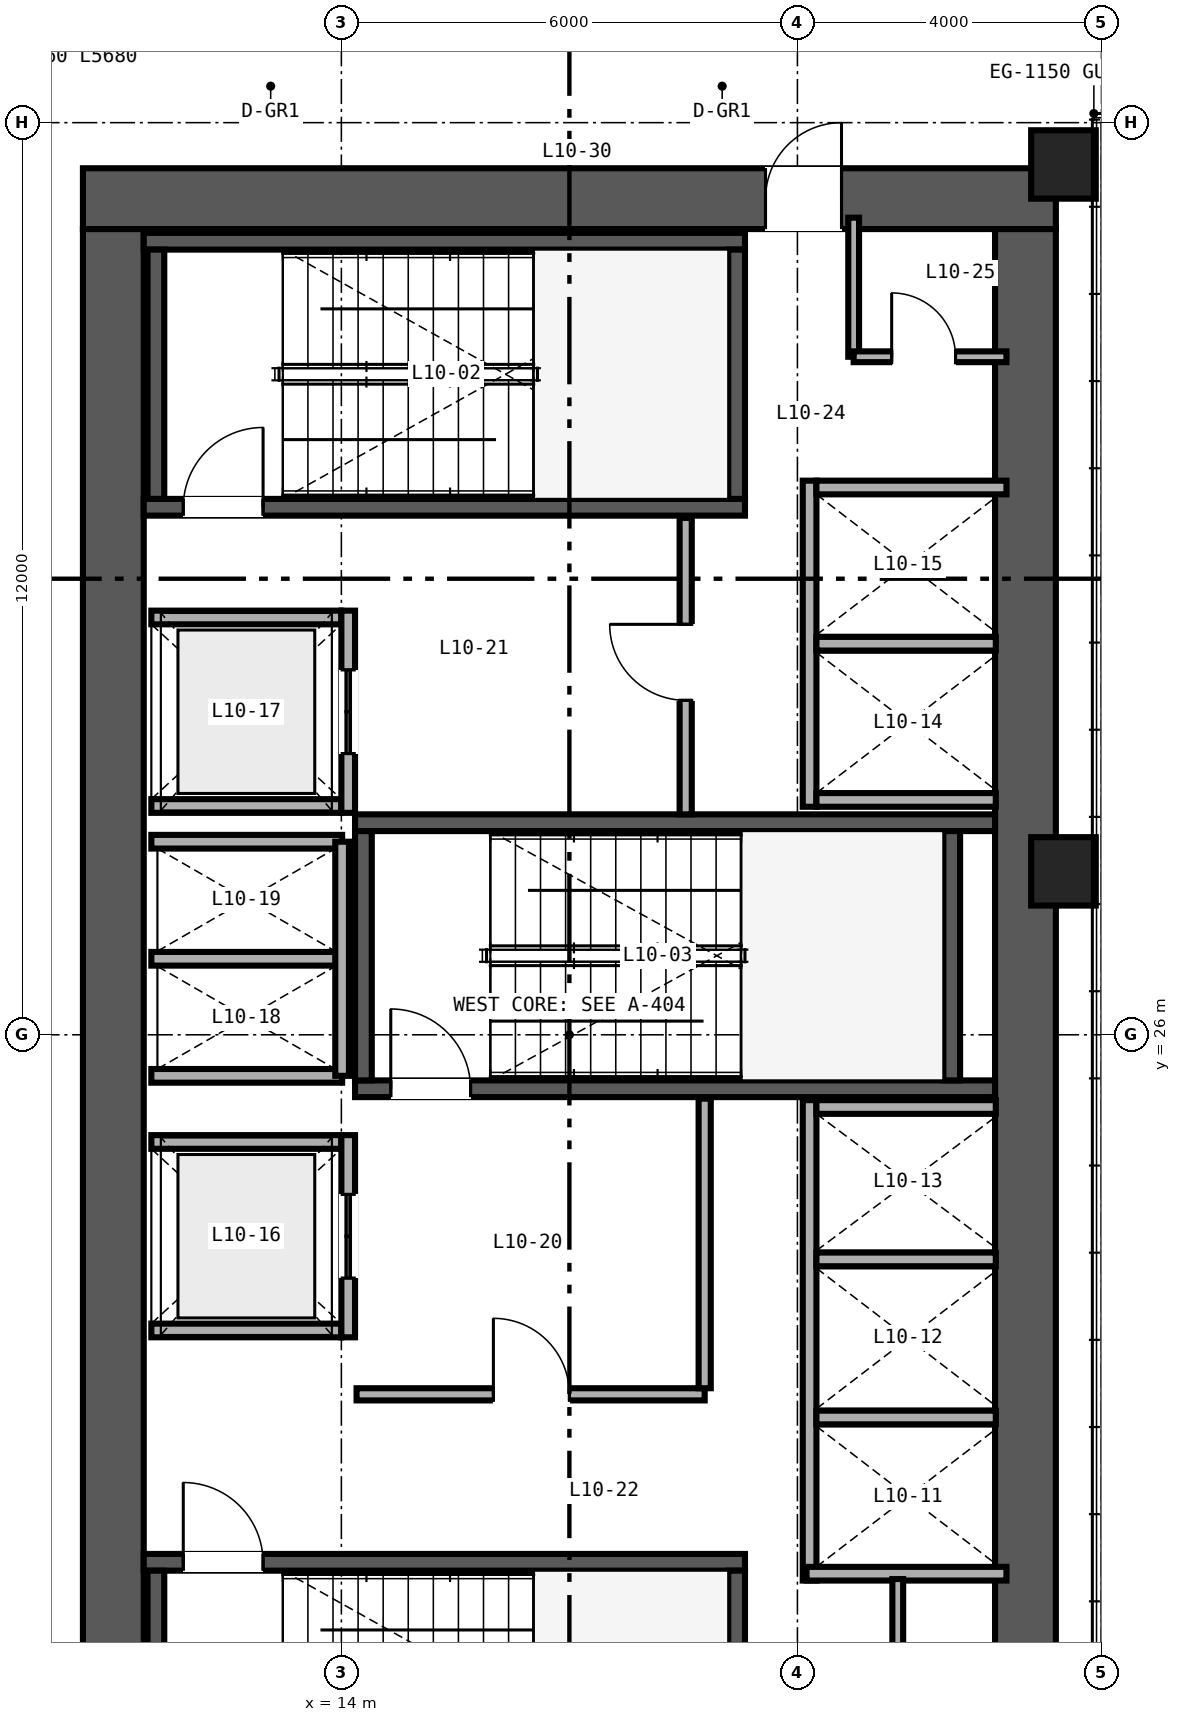
"""IFC4 building model, lengths in metres.
Left out: names, types, materials, properties, quantities, classifications, styles, units other than length and angle.
Written with IfcOpenShell. Run it as: python <this file> out.ifc"""

import sys

from ifc_helpers import new_model, si_unit, direction, frame, frame_2d, origin, origin_2d, place, context, subcontext, project, spatial, rectangle, hollow_rectangle, extrude, source, transform, mapped, element, fill, save


model = new_model("IFC4")
c1 = context("Model", 3, precision=1e-05, world=origin(), true_north=direction((0.0, 1.0)))
c2 = subcontext(c1, "Body", "Model", "MODEL_VIEW")
j1 = project(units=[si_unit("LENGTHUNIT", "METRE"), si_unit("PLANEANGLEUNIT", "RADIAN")], contexts=[c1])
p1 = place(None, origin())
s1 = spatial("IfcSite", under=j1, at=p1, CompositionType="ELEMENT")
p2 = place(p1, origin())
s2 = spatial("IfcBuilding", under=s1, at=p2, CompositionType="ELEMENT")
p3 = place(p2, frame((0.0, 0.0, 45.6)))
s3 = spatial("IfcBuildingStorey", under=s2, at=p3, CompositionType="ELEMENT", Elevation=45.6)
p4 = place(p3, frame((10.6, 37.0, 0.0), z_axis=(0.0, 0.0, 1.0), x_axis=(1.0, 0.0, 0.0)))
e1 = element("IfcWall", 1, at=p4, inside=s3, PredefinedType="SHEAR", context=c2, shape_type="SweptSolid", body=[
    extrude(rectangle(XDim=12.8, YDim=0.8, at=frame_2d((6.4, 0.0))), origin(), (0.0, 0.0, 1.0), 3.35),
])
p5 = place(p4, frame((8.98, 0.0, 0.0)))
e2 = element("IfcOpeningElement", 2, at=p5, cuts=e1, PredefinedType="OPENING", context=c2, shape_type="SweptSolid", body=[
    extrude(rectangle(XDim=1.0, YDim=2.15, at=frame_2d((0.5, 1.075))), frame((0.0, 0.41, 0.0), z_axis=(0.0, -1.0, 0.0), x_axis=(1.0, 0.0, 0.0)), (0.0, 0.0, 1.0), 0.82),
])
for number, where, z_axis, x_axis in (
    (3, (11.0, 15.4, 0.0), (0.0, 0.0, 1.0), (0.0, 1.0, 0.0)),
    (4, (23.0, 15.4, 0.0), (0.0, 0.0, 1.0), (0.0, 1.0, 0.0)),
):
    element("IfcWall", number, at=place(p3, frame(where, z_axis=z_axis, x_axis=x_axis)), inside=s3, PredefinedType="SHEAR", context=c2, shape_type="SweptSolid", body=[
        extrude(rectangle(XDim=21.2, YDim=0.8, at=frame_2d((10.6, 0.0))), origin(), (0.0, 0.0, 1.0), 3.35),
    ])
p6 = place(p3, frame((11.4, 19.06, 0.0), z_axis=(0.0, 0.0, 1.0), x_axis=(1.0, 0.0, 0.0)))
e5 = element("IfcWall", 5, at=p6, inside=s3, PredefinedType="SHEAR", context=c2, shape_type="SweptSolid", body=[
    extrude(rectangle(XDim=7.91, YDim=0.22, at=frame_2d((3.955, 0.0))), origin(), (0.0, 0.0, 1.0), 3.4),
])
p7 = place(p6, frame((0.52, 0.0, 0.0)))
e6 = element("IfcOpeningElement", 6, at=p7, cuts=e5, PredefinedType="OPENING", context=c2, shape_type="SweptSolid", body=[
    extrude(rectangle(XDim=1.05, YDim=2.15, at=frame_2d((0.525, 1.075))), frame((0.0, 0.12, 0.0), z_axis=(0.0, -1.0, 0.0), x_axis=(1.0, 0.0, 0.0)), (0.0, 0.0, 1.0), 0.24),
])
for number, where, z_axis, x_axis in (
    (7, (11.56, 15.67, 0.0), (0.0, 0.0, 1.0), (0.0, 1.0, 0.0)),
    (8, (19.2, 15.67, 0.0), (0.0, 0.0, 1.0), (0.0, 1.0, 0.0)),
):
    element("IfcWall", number, at=place(p3, frame(where, z_axis=z_axis, x_axis=x_axis)), inside=s3, PredefinedType="SHEAR", context=c2, shape_type="SweptSolid", body=[
        extrude(rectangle(XDim=3.28, YDim=0.22, at=frame_2d((1.64, 0.0))), origin(), (0.0, 0.0, 1.0), 3.4),
    ])
p8 = place(p3, frame((11.4, 32.94, 0.0), z_axis=(0.0, 0.0, 1.0), x_axis=(1.0, 0.0, 0.0)))
e9 = element("IfcWall", 9, at=p8, inside=s3, PredefinedType="SHEAR", context=c2, shape_type="SweptSolid", body=[
    extrude(rectangle(XDim=7.91, YDim=0.22, at=frame_2d((3.955, 0.0))), origin(), (0.0, 0.0, 1.0), 3.4),
])
p9 = place(p8, frame((0.52, 0.0, 0.0)))
e10 = element("IfcOpeningElement", 10, at=p9, cuts=e9, PredefinedType="OPENING", context=c2, shape_type="SweptSolid", body=[
    extrude(rectangle(XDim=1.05, YDim=2.15, at=frame_2d((0.525, 1.075))), frame((0.0, 0.12, 0.0), z_axis=(0.0, -1.0, 0.0), x_axis=(1.0, 0.0, 0.0)), (0.0, 0.0, 1.0), 0.24),
])
p10 = place(p3, frame((11.4, 36.44, 0.0), z_axis=(0.0, 0.0, 1.0), x_axis=(1.0, 0.0, 0.0)))
e11 = element("IfcWall", 11, at=p10, inside=s3, PredefinedType="SHEAR", context=c2, shape_type="SweptSolid", body=[
    extrude(rectangle(XDim=7.91, YDim=0.22, at=frame_2d((3.955, 0.0))), origin(), (0.0, 0.0, 1.0), 3.4),
])
for number, where, z_axis, x_axis in (
    (12, (11.56, 33.05, 0.0), (0.0, 0.0, 1.0), (0.0, 1.0, 0.0)),
    (13, (19.2, 33.05, 0.0), (0.0, 0.0, 1.0), (0.0, 1.0, 0.0)),
):
    element("IfcWall", number, at=place(p3, frame(where, z_axis=z_axis, x_axis=x_axis)), inside=s3, PredefinedType="SHEAR", context=c2, shape_type="SweptSolid", body=[
        extrude(rectangle(XDim=3.28, YDim=0.22, at=frame_2d((1.64, 0.0))), origin(), (0.0, 0.0, 1.0), 3.4),
    ])
p11 = place(p3, frame((14.18, 25.29, 0.0), z_axis=(0.0, 0.0, 1.0), x_axis=(1.0, 0.0, 0.0)))
e14 = element("IfcWall", 14, at=p11, inside=s3, PredefinedType="SHEAR", context=c2, shape_type="SweptSolid", body=[
    extrude(rectangle(XDim=8.42, YDim=0.22, at=frame_2d((4.21, 0.0))), origin(), (0.0, 0.0, 1.0), 3.4),
])
p12 = place(p11, frame((0.47, 0.0, 0.0)))
e15 = element("IfcOpeningElement", 15, at=p12, cuts=e14, PredefinedType="OPENING", context=c2, shape_type="SweptSolid", body=[
    extrude(rectangle(XDim=1.05, YDim=2.15, at=frame_2d((0.525, 1.075))), frame((0.0, 0.12, 0.0), z_axis=(0.0, -1.0, 0.0), x_axis=(1.0, 0.0, 0.0)), (0.0, 0.0, 1.0), 0.24),
])
p13 = place(p3, frame((14.18, 28.79, 0.0), z_axis=(0.0, 0.0, 1.0), x_axis=(1.0, 0.0, 0.0)))
e16 = element("IfcWall", 16, at=p13, inside=s3, PredefinedType="SHEAR", context=c2, shape_type="SweptSolid", body=[
    extrude(rectangle(XDim=8.42, YDim=0.22, at=frame_2d((4.21, 0.0))), origin(), (0.0, 0.0, 1.0), 3.4),
])
for number, where, z_axis, x_axis in (
    (17, (14.29, 25.4, 0.0), (0.0, 0.0, 1.0), (0.0, 1.0, 0.0)),
    (18, (22.03, 25.4, 0.0), (0.0, 0.0, 1.0), (0.0, 1.0, 0.0)),
):
    element("IfcWall", number, at=place(p3, frame(where, z_axis=z_axis, x_axis=x_axis)), inside=s3, PredefinedType="SHEAR", context=c2, shape_type="SweptSolid", body=[
        extrude(rectangle(XDim=3.28, YDim=0.22, at=frame_2d((1.64, 0.0))), origin(), (0.0, 0.0, 1.0), 3.4),
    ])
m1 = source(origin(), c2, "Body", "SweptSolid", [
    extrude(hollow_rectangle(XDim=0.85, YDim=0.9, WallThickness=0.04, at=origin_2d()), origin(), (0.0, 0.0, 1.0), 3.35),
])
for number, where, z_axis, x_axis in (
    (19, (23.5, 28.15, 0.0), (0.0, 0.0, 1.0), (1.0, 0.0, 0.0)),
    (20, (23.5, 37.45, 0.0), (0.0, 0.0, 1.0), (1.0, 0.0, 0.0)),
):
    element("IfcColumn", number, at=place(p3, frame(where, z_axis=z_axis, x_axis=x_axis)), inside=s3, PredefinedType="COLUMN", context=c2, shape_type="MappedRepresentation", body=[
        mapped(m1, transform((0.0, 0.0, 0.0), scale=1.0)),
    ])
p14 = place(p3, frame((20.16, 18.82, 0.0), z_axis=(0.0, 0.0, 1.0), x_axis=(0.0, 1.0, 0.0)))
e21 = element("IfcWall", 21, at=p14, inside=s3, PredefinedType="SOLIDWALL", context=c2, shape_type="SweptSolid", body=[
    extrude(rectangle(XDim=6.32, YDim=0.18, at=frame_2d((3.16, 0.0))), origin(), (0.0, 0.0, 1.0), 2.36),
])
p15 = place(p3, frame((20.12, 18.91, 0.0), z_axis=(0.0, 0.0, 1.0), x_axis=(1.0, 0.0, 0.0)))
e22 = element("IfcWall", 22, at=p15, inside=s3, PredefinedType="SOLIDWALL", context=c2, shape_type="SweptSolid", body=[
    extrude(rectangle(XDim=2.63, YDim=0.18, at=frame_2d((1.315, 0.0))), origin(), (0.0, 0.0, 1.0), 3.35),
])
p16 = place(p3, frame((20.25, 25.05, 0.0), z_axis=(0.0, 0.0, 1.0), x_axis=(1.0, 0.0, 0.0)))
e23 = element("IfcWall", 23, at=p16, inside=s3, PredefinedType="SOLIDWALL", context=c2, shape_type="SweptSolid", body=[
    extrude(rectangle(XDim=2.36, YDim=0.18, at=frame_2d((1.18, 0.0))), origin(), (0.0, 0.0, 1.0), 3.35),
])
p17 = place(p3, frame((20.25, 20.965, 0.0), z_axis=(0.0, 0.0, 1.0), x_axis=(1.0, 0.0, 0.0)))
e24 = element("IfcWall", 24, at=p17, inside=s3, PredefinedType="SOLIDWALL", context=c2, shape_type="SweptSolid", body=[
    extrude(rectangle(XDim=2.36, YDim=0.18, at=frame_2d((1.18, 0.0))), origin(), (0.0, 0.0, 1.0), 2.36),
])
p18 = place(p3, frame((20.25, 23.045, 0.0), z_axis=(0.0, 0.0, 1.0), x_axis=(1.0, 0.0, 0.0)))
e25 = element("IfcWall", 25, at=p18, inside=s3, PredefinedType="SOLIDWALL", context=c2, shape_type="SweptSolid", body=[
    extrude(rectangle(XDim=2.36, YDim=0.18, at=frame_2d((1.18, 0.0))), origin(), (0.0, 0.0, 1.0), 3.35),
])
p19 = place(p3, frame((20.16, 29.0, 0.0), z_axis=(0.0, 0.0, 1.0), x_axis=(0.0, 1.0, 0.0)))
e26 = element("IfcWall", 26, at=p19, inside=s3, PredefinedType="SOLIDWALL", context=c2, shape_type="SweptSolid", body=[
    extrude(rectangle(XDim=4.29, YDim=0.18, at=frame_2d((2.145, 0.0))), origin(), (0.0, 0.0, 1.0), 3.35),
])
p20 = place(p3, frame((20.25, 29.09, 0.0), z_axis=(0.0, 0.0, 1.0), x_axis=(1.0, 0.0, 0.0)))
e27 = element("IfcWall", 27, at=p20, inside=s3, PredefinedType="SOLIDWALL", context=c2, shape_type="SweptSolid", body=[
    extrude(rectangle(XDim=2.36, YDim=0.18, at=frame_2d((1.18, 0.0))), origin(), (0.0, 0.0, 1.0), 3.35),
])
p21 = place(p3, frame((20.25, 33.2, 0.0), z_axis=(0.0, 0.0, 1.0), x_axis=(1.0, 0.0, 0.0)))
e28 = element("IfcWall", 28, at=p21, inside=s3, PredefinedType="SOLIDWALL", context=c2, shape_type="SweptSolid", body=[
    extrude(rectangle(XDim=2.5, YDim=0.18, at=frame_2d((1.25, 0.0))), origin(), (0.0, 0.0, 1.0), 3.35),
])
p22 = place(p3, frame((20.25, 31.145, 0.0), z_axis=(0.0, 0.0, 1.0), x_axis=(1.0, 0.0, 0.0)))
e29 = element("IfcWall", 29, at=p22, inside=s3, PredefinedType="SOLIDWALL", context=c2, shape_type="SweptSolid", body=[
    extrude(rectangle(XDim=2.36, YDim=0.18, at=frame_2d((1.18, 0.0))), origin(), (0.0, 0.0, 1.0), 3.35),
])
for number, where, z_axis, x_axis in (
    (30, (11.5, 22.11, 0.0), (0.0, 0.0, 1.0), (1.0, 0.0, 0.0)),
    (31, (11.5, 24.59, 0.0), (0.0, 0.0, 1.0), (1.0, 0.0, 0.0)),
):
    element("IfcWall", number, at=place(p3, frame(where, z_axis=z_axis, x_axis=x_axis)), inside=s3, PredefinedType="SOLIDWALL", context=c2, shape_type="SweptSolid", body=[
        extrude(rectangle(XDim=2.5, YDim=0.18, at=frame_2d((1.25, 0.0))), origin(), (0.0, 0.0, 1.0), 3.35),
    ])
p23 = place(p3, frame((14.09, 22.02, 0.0), z_axis=(0.0, 0.0, 1.0), x_axis=(0.0, 1.0, 0.0)))
e32 = element("IfcWall", 32, at=p23, inside=s3, PredefinedType="SOLIDWALL", context=c2, shape_type="SweptSolid", body=[
    extrude(rectangle(XDim=2.66, YDim=0.18, at=frame_2d((1.33, 0.0))), origin(), (0.0, 0.0, 1.0), 3.35),
])
p24 = place(p23, frame((0.78, 0.0, 0.0)))
e33 = element("IfcOpeningElement", 33, at=p24, cuts=e32, PredefinedType="OPENING", context=c2, shape_type="SweptSolid", body=[
    extrude(rectangle(XDim=1.1, YDim=2.2, at=frame_2d((0.55, 1.1))), frame((0.0, 0.1, 0.0), z_axis=(0.0, -1.0, 0.0), x_axis=(1.0, 0.0, 0.0)), (0.0, 0.0, 1.0), 0.2),
])
for number, where, z_axis, x_axis in (
    (34, (11.5, 29.01, 0.0), (0.0, 0.0, 1.0), (1.0, 0.0, 0.0)),
    (35, (11.5, 31.49, 0.0), (0.0, 0.0, 1.0), (1.0, 0.0, 0.0)),
):
    element("IfcWall", number, at=place(p3, frame(where, z_axis=z_axis, x_axis=x_axis)), inside=s3, PredefinedType="SOLIDWALL", context=c2, shape_type="SweptSolid", body=[
        extrude(rectangle(XDim=2.5, YDim=0.18, at=frame_2d((1.25, 0.0))), origin(), (0.0, 0.0, 1.0), 3.35),
    ])
p25 = place(p3, frame((14.09, 28.92, 0.0), z_axis=(0.0, 0.0, 1.0), x_axis=(0.0, 1.0, 0.0)))
e36 = element("IfcWall", 36, at=p25, inside=s3, PredefinedType="SOLIDWALL", context=c2, shape_type="SweptSolid", body=[
    extrude(rectangle(XDim=2.66, YDim=0.18, at=frame_2d((1.33, 0.0))), origin(), (0.0, 0.0, 1.0), 3.35),
])
p26 = place(p25, frame((0.78, 0.0, 0.0)))
e37 = element("IfcOpeningElement", 37, at=p26, cuts=e36, PredefinedType="OPENING", context=c2, shape_type="SweptSolid", body=[
    extrude(rectangle(XDim=1.1, YDim=2.2, at=frame_2d((0.55, 1.1))), frame((0.0, 0.1, 0.0), z_axis=(0.0, -1.0, 0.0), x_axis=(1.0, 0.0, 0.0)), (0.0, 0.0, 1.0), 0.2),
])
for number, where, z_axis, x_axis in (
    (38, (11.5, 25.46, 0.0), (0.0, 0.0, 1.0), (1.0, 0.0, 0.0)),
    (39, (11.5, 27.0, 0.0), (0.0, 0.0, 1.0), (1.0, 0.0, 0.0)),
    (40, (11.5, 28.54, 0.0), (0.0, 0.0, 1.0), (1.0, 0.0, 0.0)),
):
    element("IfcWall", number, at=place(p3, frame(where, z_axis=z_axis, x_axis=x_axis)), inside=s3, PredefinedType="SOLIDWALL", context=c2, shape_type="SweptSolid", body=[
        extrude(rectangle(XDim=2.51, YDim=0.18, at=frame_2d((1.255, 0.0))), origin(), (0.0, 0.0, 1.0), 3.35),
    ])
p27 = place(p3, frame((14.01, 25.46, 0.0), z_axis=(0.0, 0.0, 1.0), x_axis=(0.0, 1.0, 0.0)))
e41 = element("IfcWall", 41, at=p27, inside=s3, PredefinedType="SOLIDWALL", context=c2, shape_type="SweptSolid", body=[
    extrude(rectangle(XDim=3.08, YDim=0.18, at=frame_2d((1.54, 0.0))), origin(), (0.0, 0.0, 1.0), 3.35),
])
p28 = place(p3, frame((14.2, 21.27, 0.0), z_axis=(0.0, 0.0, 1.0), x_axis=(1.0, 0.0, 0.0)))
e42 = element("IfcWall", 42, at=p28, inside=s3, PredefinedType="PARTITIONING", context=c2, shape_type="SweptSolid", body=[
    extrude(rectangle(XDim=4.58, YDim=0.16, at=frame_2d((2.29, 0.0))), origin(), (0.0, 0.0, 1.0), 3.35),
])
p29 = place(p28, frame((1.8, 0.0, 0.0)))
e43 = element("IfcOpeningElement", 43, at=p29, cuts=e42, PredefinedType="OPENING", context=c2, shape_type="SweptSolid", body=[
    extrude(rectangle(XDim=1.0, YDim=2.15, at=frame_2d((0.5, 1.075))), frame((0.0, 0.09, 0.0), z_axis=(0.0, -1.0, 0.0), x_axis=(1.0, 0.0, 0.0)), (0.0, 0.0, 1.0), 0.18),
])
p30 = place(p3, frame((18.78, 21.35, 0.0), z_axis=(0.0, 0.0, 1.0), x_axis=(0.0, 1.0, 0.0)))
e44 = element("IfcWall", 44, at=p30, inside=s3, PredefinedType="PARTITIONING", context=c2, shape_type="SweptSolid", body=[
    extrude(rectangle(XDim=3.81, YDim=0.16, at=frame_2d((1.905, 0.0))), origin(), (0.0, 0.0, 1.0), 3.35),
])
p31 = place(p3, frame((18.53, 28.9, 0.0), z_axis=(0.0, 0.0, 1.0), x_axis=(0.0, 1.0, 0.0)))
e45 = element("IfcWall", 45, at=p31, inside=s3, PredefinedType="PARTITIONING", context=c2, shape_type="SweptSolid", body=[
    extrude(rectangle(XDim=3.9, YDim=0.16, at=frame_2d((1.95, 0.0))), origin(), (0.0, 0.0, 1.0), 3.35),
])
p32 = place(p31, frame((1.5, 0.0, 0.0)))
e46 = element("IfcOpeningElement", 46, at=p32, cuts=e45, PredefinedType="OPENING", context=c2, shape_type="SweptSolid", body=[
    extrude(rectangle(XDim=1.0, YDim=2.15, at=frame_2d((0.5, 1.075))), frame((0.0, 0.09, 0.0), z_axis=(0.0, -1.0, 0.0), x_axis=(1.0, 0.0, 0.0)), (0.0, 0.0, 1.0), 0.18),
])
p33 = place(p3, frame((21.32, 15.25, 0.0), z_axis=(0.0, 0.0, 1.0), x_axis=(0.0, 1.0, 0.0)))
e47 = element("IfcWall", 47, at=p33, inside=s3, PredefinedType="PARTITIONING", context=c2, shape_type="SweptSolid", body=[
    extrude(rectangle(XDim=3.59, YDim=0.142, at=frame_2d((1.795, 0.0))), origin(), (0.0, 0.0, 1.0), 3.35),
])
p34 = place(p33, frame((1.25, 0.0, 0.0)))
e48 = element("IfcOpeningElement", 48, at=p34, cuts=e47, PredefinedType="OPENING", context=c2, shape_type="SweptSolid", body=[
    extrude(rectangle(XDim=0.84, YDim=2.1, at=frame_2d((0.42, 1.05))), frame((0.0, 0.081, 0.0), z_axis=(0.0, -1.0, 0.0), x_axis=(1.0, 0.0, 0.0)), (0.0, 0.0, 1.0), 0.162),
])
p35 = place(p3, frame((20.74, 34.92, 0.0), z_axis=(0.0, 0.0, 1.0), x_axis=(0.0, 1.0, 0.0)))
e49 = element("IfcWall", 49, at=p35, inside=s3, PredefinedType="PARTITIONING", context=c2, shape_type="SweptSolid", body=[
    extrude(rectangle(XDim=1.83, YDim=0.142, at=frame_2d((0.915, 0.0))), origin(), (0.0, 0.0, 1.0), 3.35),
])
p36 = place(p3, frame((20.74, 34.92, 0.0), z_axis=(0.0, 0.0, 1.0), x_axis=(1.0, 0.0, 0.0)))
e50 = element("IfcWall", 50, at=p36, inside=s3, PredefinedType="PARTITIONING", context=c2, shape_type="SweptSolid", body=[
    extrude(rectangle(XDim=2.01, YDim=0.142, at=frame_2d((1.005, 0.0))), origin(), (0.0, 0.0, 1.0), 3.35),
])
p37 = place(p36, frame((0.5, 0.0, 0.0)))
e51 = element("IfcOpeningElement", 51, at=p37, cuts=e50, PredefinedType="OPENING", context=c2, shape_type="SweptSolid", body=[
    extrude(rectangle(XDim=0.84, YDim=2.1, at=frame_2d((0.42, 1.05))), frame((0.0, 0.081, 0.0), z_axis=(0.0, -1.0, 0.0), x_axis=(1.0, 0.0, 0.0)), (0.0, 0.0, 1.0), 0.162),
])
m2 = source(origin(), c2, "Body", "SweptSolid", [
    extrude(rectangle(XDim=1.05, YDim=2.15, at=frame_2d((0.525, 1.075))), frame((0.0, 0.025, 0.0), z_axis=(0.0, -1.0, 0.0), x_axis=(1.0, 0.0, 0.0)), (0.0, 0.0, 1.0), 0.05),
])
p38 = place(p7, origin())
e52 = element("IfcDoor", 52, at=p38, inside=s3, OperationType="SINGLE_SWING_LEFT", PredefinedType="DOOR", context=c2, shape_type="MappedRepresentation", body=[
    mapped(m2, transform((0.0, 0.0, 0.0), scale=1.0)),
])
fill(e6, e52)
p39 = place(p9, origin())
e53 = element("IfcDoor", 53, at=p39, inside=s3, OperationType="SINGLE_SWING_RIGHT", PredefinedType="DOOR", context=c2, shape_type="MappedRepresentation", body=[
    mapped(m2, transform((0.0, 0.0, 0.0), scale=1.0)),
])
fill(e10, e53)
p40 = place(p12, origin())
e54 = element("IfcDoor", 54, at=p40, inside=s3, OperationType="SINGLE_SWING_LEFT", PredefinedType="DOOR", context=c2, shape_type="MappedRepresentation", body=[
    mapped(m2, transform((0.0, 0.0, 0.0), scale=1.0)),
])
fill(e15, e54)
m3 = source(origin(), c2, "Body", "SweptSolid", [
    extrude(rectangle(XDim=1.1, YDim=2.2, at=frame_2d((0.55, 1.1))), frame((0.0, 0.025, 0.0), z_axis=(0.0, -1.0, 0.0), x_axis=(1.0, 0.0, 0.0)), (0.0, 0.0, 1.0), 0.05),
])
p41 = place(p24, origin())
e55 = element("IfcDoor", 55, at=p41, inside=s3, OperationType="DOUBLE_DOOR_SLIDING", PredefinedType="DOOR", context=c2, shape_type="MappedRepresentation", body=[
    mapped(m3, transform((0.0, 0.0, 0.0), scale=1.0)),
])
fill(e33, e55)
p42 = place(p26, origin())
e56 = element("IfcDoor", 56, at=p42, inside=s3, OperationType="DOUBLE_DOOR_SLIDING", PredefinedType="DOOR", context=c2, shape_type="MappedRepresentation", body=[
    mapped(m3, transform((0.0, 0.0, 0.0), scale=1.0)),
])
fill(e37, e56)
m4 = source(origin(), c2, "Body", "SweptSolid", [
    extrude(rectangle(XDim=1.0, YDim=2.15, at=frame_2d((0.5, 1.075))), frame((0.0, 0.025, 0.0), z_axis=(0.0, -1.0, 0.0), x_axis=(1.0, 0.0, 0.0)), (0.0, 0.0, 1.0), 0.05),
])
p43 = place(p29, origin())
e57 = element("IfcDoor", 57, at=p43, inside=s3, OperationType="SINGLE_SWING_LEFT", PredefinedType="DOOR", context=c2, shape_type="MappedRepresentation", body=[
    mapped(m4, transform((0.0, 0.0, 0.0), scale=1.0)),
])
fill(e43, e57)
p44 = place(p32, origin())
e58 = element("IfcDoor", 58, at=p44, inside=s3, OperationType="SINGLE_SWING_RIGHT", PredefinedType="DOOR", context=c2, shape_type="MappedRepresentation", body=[
    mapped(m4, transform((0.0, 0.0, 0.0), scale=1.0)),
])
fill(e46, e58)
m5 = source(origin(), c2, "Body", "SweptSolid", [
    extrude(rectangle(XDim=0.84, YDim=2.1, at=frame_2d((0.42, 1.05))), frame((0.0, 0.025, 0.0), z_axis=(0.0, -1.0, 0.0), x_axis=(1.0, 0.0, 0.0)), (0.0, 0.0, 1.0), 0.05),
])
p45 = place(p37, origin())
e59 = element("IfcDoor", 59, at=p45, inside=s3, OperationType="SINGLE_SWING_LEFT", PredefinedType="DOOR", context=c2, shape_type="MappedRepresentation", body=[
    mapped(m5, transform((0.0, 0.0, 0.0), scale=1.0)),
])
fill(e51, e59)
p46 = place(p5, origin())
e60 = element("IfcDoor", 60, at=p46, inside=s3, OperationType="SINGLE_SWING_RIGHT", PredefinedType="DOOR", context=c2, shape_type="MappedRepresentation", body=[
    mapped(m4, transform((0.0, 0.0, 0.0), scale=1.0)),
])
fill(e2, e60)
save(model, sys.argv[1])
